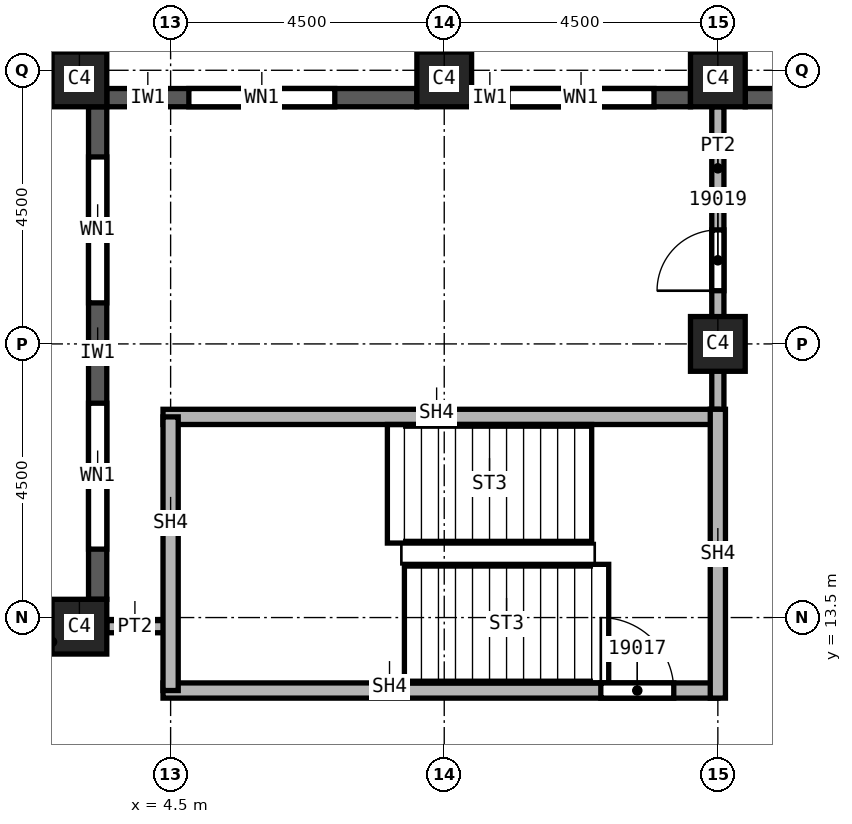
"""IFC4 building model, lengths in metres.
Left out: names, types, materials, properties, quantities, classifications, styles, units other than length and angle.
Written with IfcOpenShell. Run it as: python <this file> out.ifc"""

import sys

from ifc_helpers import new_model, si_unit, direction, frame, frame_2d, origin, origin_2d, place, context, subcontext, project, spatial, rectangle, extrude, element, fill, save


model = new_model("IFC4")
c1 = context("Model", 3, precision=1e-05, world=origin(), true_north=direction((0.0, 1.0)))
c2 = subcontext(c1, "Body", "Model", "MODEL_VIEW")
j1 = project(units=[si_unit("LENGTHUNIT", "METRE"), si_unit("PLANEANGLEUNIT", "RADIAN")], contexts=[c1])
p1 = place(None, origin())
s1 = spatial("IfcSite", under=j1, at=p1, CompositionType="ELEMENT")
p2 = place(p1, origin())
s2 = spatial("IfcBuilding", under=s1, at=p2, CompositionType="ELEMENT")
p3 = place(p2, frame((0.0, 0.0, 282.0)))
s3 = spatial("IfcBuildingStorey", under=s2, at=p3, CompositionType="ELEMENT", Elevation=282.0)
for number, where, z_axis, x_axis in (
    (1, (13.5, 18.0, 0.0), (0.0, 0.0, 1.0), (1.0, 0.0, 0.0)),
    (2, (3.0, 22.35, 0.0), (0.0, 0.0, 1.0), (1.0, 0.0, 0.0)),
    (3, (9.0, 22.35, 0.0), (0.0, 0.0, 1.0), (1.0, 0.0, 0.0)),
    (4, (13.5, 22.35, 0.0), (0.0, 0.0, 1.0), (1.0, 0.0, 0.0)),
    (5, (3.0, 13.35, 0.0), (0.0, 0.0, 1.0), (1.0, 0.0, 0.0)),
):
    element("IfcColumn", number, at=place(p3, frame(where, z_axis=z_axis, x_axis=x_axis)), inside=s3, PredefinedType="COLUMN", context=c2, shape_type="SweptSolid", body=[
        extrude(rectangle(XDim=0.9, YDim=0.9, at=origin_2d()), origin(), (0.0, 0.0, 1.0), 3.72),
    ])
p4 = place(p3, frame((17.55, 22.05, 0.0), z_axis=(0.0, 0.0, 1.0), x_axis=(-1.0, 0.0, 0.0)))
e6 = element("IfcWall", 6, at=p4, inside=s3, PredefinedType="SOLIDWALL", context=c2, shape_type="SweptSolid", body=[
    extrude(rectangle(XDim=3.6, YDim=0.3, at=frame_2d((1.8, 0.0))), origin(), (0.0, 0.0, 1.0), 3.12),
])
p5 = place(p4, frame((0.775, 0.0, 0.8)))
e7 = element("IfcOpeningElement", 7, at=p5, cuts=e6, PredefinedType="OPENING", context=c2, shape_type="SweptSolid", body=[
    extrude(rectangle(XDim=1.0, YDim=1.95, at=frame_2d((0.5, 0.975))), frame((0.0, 0.15, 0.0), z_axis=(0.0, -1.0, 0.0), x_axis=(1.0, 0.0, 0.0)), (0.0, 0.0, 1.0), 0.3),
])
p6 = place(p4, frame((2.375, 0.0, 0.8)))
e8 = element("IfcOpeningElement", 8, at=p6, cuts=e6, PredefinedType="OPENING", context=c2, shape_type="SweptSolid", body=[
    extrude(rectangle(XDim=0.6, YDim=1.95, at=frame_2d((0.3, 0.975))), frame((0.0, 0.15, 0.0), z_axis=(0.0, -1.0, 0.0), x_axis=(1.0, 0.0, 0.0)), (0.0, 0.0, 1.0), 0.3),
])
p7 = place(p3, frame((13.05, 22.05, 0.0), z_axis=(0.0, 0.0, 1.0), x_axis=(-1.0, 0.0, 0.0)))
e9 = element("IfcWall", 9, at=p7, inside=s3, PredefinedType="SOLIDWALL", context=c2, shape_type="SweptSolid", body=[
    extrude(rectangle(XDim=3.6, YDim=0.3, at=frame_2d((1.8, 0.0))), origin(), (0.0, 0.0, 1.0), 3.12),
])
p8 = place(p7, frame((0.6, 0.0, 0.8)))
e10 = element("IfcOpeningElement", 10, at=p8, cuts=e9, PredefinedType="OPENING", context=c2, shape_type="SweptSolid", body=[
    extrude(rectangle(XDim=2.4, YDim=1.95, at=frame_2d((1.2, 0.975))), frame((0.0, 0.15, 0.0), z_axis=(0.0, -1.0, 0.0), x_axis=(1.0, 0.0, 0.0)), (0.0, 0.0, 1.0), 0.3),
])
p9 = place(p3, frame((8.55, 22.05, 0.0), z_axis=(0.0, 0.0, 1.0), x_axis=(-1.0, 0.0, 0.0)))
e11 = element("IfcWall", 11, at=p9, inside=s3, PredefinedType="SOLIDWALL", context=c2, shape_type="SweptSolid", body=[
    extrude(rectangle(XDim=5.1, YDim=0.3, at=frame_2d((2.55, 0.0))), origin(), (0.0, 0.0, 1.0), 3.12),
])
p10 = place(p9, frame((1.35, 0.0, 0.8)))
e12 = element("IfcOpeningElement", 12, at=p10, cuts=e11, PredefinedType="OPENING", context=c2, shape_type="SweptSolid", body=[
    extrude(rectangle(XDim=2.4, YDim=1.95, at=frame_2d((1.2, 0.975))), frame((0.0, 0.15, 0.0), z_axis=(0.0, -1.0, 0.0), x_axis=(1.0, 0.0, 0.0)), (0.0, 0.0, 1.0), 0.3),
])
p11 = place(p3, frame((3.3, 21.9, 0.0), z_axis=(0.0, 0.0, 1.0), x_axis=(0.0, -1.0, 0.0)))
e13 = element("IfcWall", 13, at=p11, inside=s3, PredefinedType="SOLIDWALL", context=c2, shape_type="SweptSolid", body=[
    extrude(rectangle(XDim=8.1, YDim=0.3, at=frame_2d((4.05, 0.0))), origin(), (0.0, 0.0, 1.0), 3.12),
])
p12 = place(p11, frame((0.825, 0.0, 0.8)))
e14 = element("IfcOpeningElement", 14, at=p12, cuts=e13, PredefinedType="OPENING", context=c2, shape_type="SweptSolid", body=[
    extrude(rectangle(XDim=2.4, YDim=1.95, at=frame_2d((1.2, 0.975))), frame((0.0, 0.15, 0.0), z_axis=(0.0, -1.0, 0.0), x_axis=(1.0, 0.0, 0.0)), (0.0, 0.0, 1.0), 0.3),
])
p13 = place(p11, frame((4.875, 0.0, 0.8)))
e15 = element("IfcOpeningElement", 15, at=p13, cuts=e13, PredefinedType="OPENING", context=c2, shape_type="SweptSolid", body=[
    extrude(rectangle(XDim=2.4, YDim=1.95, at=frame_2d((1.2, 0.975))), frame((0.0, 0.15, 0.0), z_axis=(0.0, -1.0, 0.0), x_axis=(1.0, 0.0, 0.0)), (0.0, 0.0, 1.0), 0.3),
])
p14 = place(p3, frame((3.45, 13.35, 0.0), z_axis=(0.0, 0.0, 1.0), x_axis=(1.0, 0.0, 0.0)))
e16 = element("IfcWall", 16, at=p14, inside=s3, PredefinedType="PARTITIONING", context=c2, shape_type="SweptSolid", body=[
    extrude(rectangle(XDim=1.049, YDim=0.2, at=frame_2d((0.524, 0.0))), origin(), (0.0, 0.0, 1.0), 3.72),
])
p15 = place(p3, frame((13.5, 16.675, 0.0), z_axis=(0.0, 0.0, 1.0), x_axis=(0.0, 1.0, 0.0)))
e17 = element("IfcWall", 17, at=p15, inside=s3, PredefinedType="PARTITIONING", context=c2, shape_type="SweptSolid", body=[
    extrude(rectangle(XDim=5.225, YDim=0.2, at=frame_2d((2.612, 0.0))), origin(), (0.0, 0.0, 1.0), 3.72),
])
p16 = place(p15, frame((2.2, 0.0, 0.0)))
e18 = element("IfcOpeningElement", 18, at=p16, cuts=e17, PredefinedType="OPENING", context=c2, shape_type="SweptSolid", body=[
    extrude(rectangle(XDim=1.0, YDim=2.1, at=frame_2d((0.5, 1.05))), frame((0.0, 0.1, 0.0), z_axis=(0.0, -1.0, 0.0), x_axis=(1.0, 0.0, 0.0)), (0.0, 0.0, 1.0), 0.2),
])
p17 = place(p3, frame((4.375, 12.3, 0.0), z_axis=(0.0, 0.0, 1.0), x_axis=(1.0, 0.0, 0.0)))
e19 = element("IfcWall", 19, at=p17, inside=s3, PredefinedType="SOLIDWALL", context=c2, shape_type="SweptSolid", body=[
    extrude(rectangle(XDim=9.125, YDim=0.25, at=frame_2d((4.562, 0.0))), origin(), (0.0, 0.0, 1.0), 3.72),
])
p18 = place(p17, frame((7.2, 0.0, 0.0)))
e20 = element("IfcOpeningElement", 20, at=p18, cuts=e19, PredefinedType="OPENING", context=c2, shape_type="SweptSolid", body=[
    extrude(rectangle(XDim=1.2, YDim=2.1, at=frame_2d((0.6, 1.05))), frame((0.0, 0.125, 0.0), z_axis=(0.0, -1.0, 0.0), x_axis=(1.0, 0.0, 0.0)), (0.0, 0.0, 1.0), 0.25),
])
p19 = place(p3, frame((4.375, 16.8, 0.0), z_axis=(0.0, 0.0, 1.0), x_axis=(1.0, 0.0, 0.0)))
e21 = element("IfcWall", 21, at=p19, inside=s3, PredefinedType="SOLIDWALL", context=c2, shape_type="SweptSolid", body=[
    extrude(rectangle(XDim=9.125, YDim=0.25, at=frame_2d((4.562, 0.0))), origin(), (0.0, 0.0, 1.0), 3.72),
])
p20 = place(p3, frame((4.5, 12.3, 0.0), z_axis=(0.0, 0.0, 1.0), x_axis=(0.0, 1.0, 0.0)))
e22 = element("IfcWall", 22, at=p20, inside=s3, PredefinedType="SOLIDWALL", context=c2, shape_type="SweptSolid", body=[
    extrude(rectangle(XDim=4.5, YDim=0.25, at=frame_2d((2.25, 0.0))), origin(), (0.0, 0.0, 1.0), 3.72),
])
p21 = place(p3, frame((13.5, 12.175, 0.0), z_axis=(0.0, 0.0, 1.0), x_axis=(0.0, 1.0, 0.0)))
e23 = element("IfcWall", 23, at=p21, inside=s3, PredefinedType="SOLIDWALL", context=c2, shape_type="SweptSolid", body=[
    extrude(rectangle(XDim=4.75, YDim=0.25, at=frame_2d((2.375, 0.0))), origin(), (0.0, 0.0, 1.0), 3.72),
])
p22 = place(p8, origin())
e24 = element("IfcWindow", 24, at=p22, inside=s3, PartitioningType="SINGLE_PANEL", PredefinedType="WINDOW", context=c2, shape_type="SweptSolid", body=[
    extrude(rectangle(XDim=2.4, YDim=1.95, at=frame_2d((1.2, 0.975))), frame((0.0, 0.03, 0.0), z_axis=(0.0, -1.0, 0.0), x_axis=(1.0, 0.0, 0.0)), (0.0, 0.0, 1.0), 0.06),
])
fill(e10, e24)
p23 = place(p10, origin())
e25 = element("IfcWindow", 25, at=p23, inside=s3, PartitioningType="SINGLE_PANEL", PredefinedType="WINDOW", context=c2, shape_type="SweptSolid", body=[
    extrude(rectangle(XDim=2.4, YDim=1.95, at=frame_2d((1.2, 0.975))), frame((0.0, 0.03, 0.0), z_axis=(0.0, -1.0, 0.0), x_axis=(1.0, 0.0, 0.0)), (0.0, 0.0, 1.0), 0.06),
])
fill(e12, e25)
p24 = place(p12, origin())
e26 = element("IfcWindow", 26, at=p24, inside=s3, PartitioningType="SINGLE_PANEL", PredefinedType="WINDOW", context=c2, shape_type="SweptSolid", body=[
    extrude(rectangle(XDim=2.4, YDim=1.95, at=frame_2d((1.2, 0.975))), frame((0.0, 0.03, 0.0), z_axis=(0.0, -1.0, 0.0), x_axis=(1.0, 0.0, 0.0)), (0.0, 0.0, 1.0), 0.06),
])
fill(e14, e26)
p25 = place(p13, origin())
e27 = element("IfcWindow", 27, at=p25, inside=s3, PartitioningType="SINGLE_PANEL", PredefinedType="WINDOW", context=c2, shape_type="SweptSolid", body=[
    extrude(rectangle(XDim=2.4, YDim=1.95, at=frame_2d((1.2, 0.975))), frame((0.0, 0.03, 0.0), z_axis=(0.0, -1.0, 0.0), x_axis=(1.0, 0.0, 0.0)), (0.0, 0.0, 1.0), 0.06),
])
fill(e15, e27)
p26 = place(p18, origin())
e28 = element("IfcDoor", 28, at=p26, inside=s3, OperationType="SINGLE_SWING_RIGHT", PredefinedType="DOOR", context=c2, shape_type="SweptSolid", body=[
    extrude(rectangle(XDim=1.2, YDim=2.1, at=frame_2d((0.6, 1.05))), frame((0.0, 0.025, 0.0), z_axis=(0.0, -1.0, 0.0), x_axis=(1.0, 0.0, 0.0)), (0.0, 0.0, 1.0), 0.05),
])
fill(e20, e28)
p27 = place(p16, origin())
e29 = element("IfcDoor", 29, at=p27, inside=s3, OperationType="SINGLE_SWING_RIGHT", PredefinedType="DOOR", context=c2, shape_type="SweptSolid", body=[
    extrude(rectangle(XDim=1.0, YDim=2.1, at=frame_2d((0.5, 1.05))), frame((0.0, 0.025, 0.0), z_axis=(0.0, -1.0, 0.0), x_axis=(1.0, 0.0, 0.0)), (0.0, 0.0, 1.0), 0.05),
])
fill(e18, e29)
save(model, sys.argv[1])
